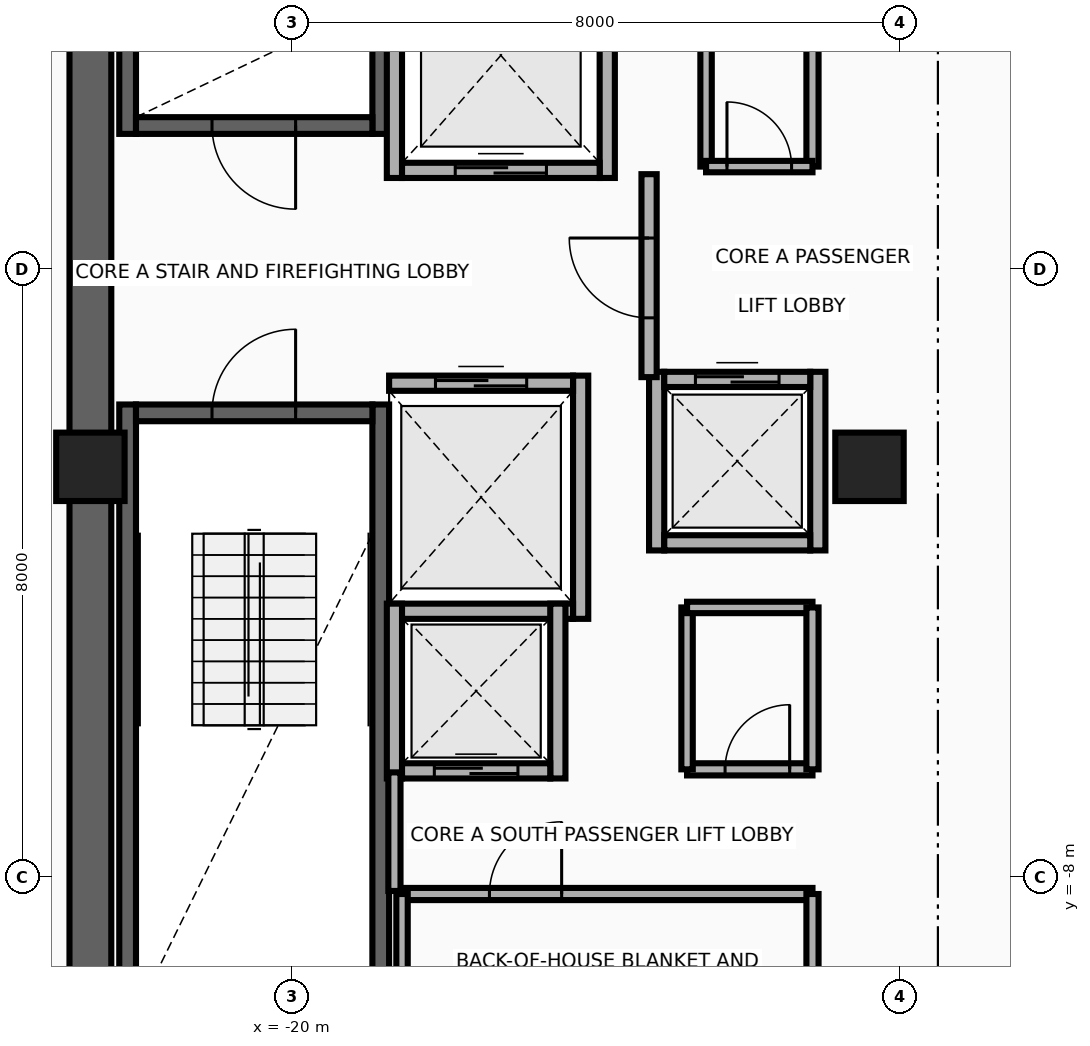
"""IFC4 building model, lengths in metres.
Left out: names, types, materials, properties, quantities, classifications, styles, units other than length and angle.
Written with IfcOpenShell. Run it as: python <this file> out.ifc"""

import sys

from ifc_helpers import new_model, si_unit, direction, frame, frame_2d, origin, origin_2d, place, context, subcontext, project, spatial, rectangle, extrude, source, transform, mapped, element, fill, save


model = new_model("IFC4")
c1 = context("Model", 3, precision=1e-05, world=origin(), true_north=direction((0.0, 1.0)))
c2 = subcontext(c1, "Body", "Model", "MODEL_VIEW")
j1 = project(units=[si_unit("LENGTHUNIT", "METRE"), si_unit("PLANEANGLEUNIT", "RADIAN")], contexts=[c1])
p1 = place(None, origin())
s1 = spatial("IfcSite", under=j1, at=p1, CompositionType="ELEMENT")
p2 = place(p1, origin())
s2 = spatial("IfcBuilding", under=s1, at=p2, CompositionType="ELEMENT")
p3 = place(p2, frame((0.0, 0.0, 226.5)))
s3 = spatial("IfcBuildingStorey", under=s2, at=p3, CompositionType="ELEMENT", Elevation=226.5)
for number, where, z_axis, x_axis in (
    (1, (-22.16, 1.78, 0.0), (0.0, 0.0, 1.0), (0.0, 1.0, 0.0)),
    (2, (-18.83, 1.78, 0.0), (0.0, 0.0, 1.0), (0.0, 1.0, 0.0)),
):
    element("IfcWall", number, at=place(p3, frame(where, z_axis=z_axis, x_axis=x_axis)), inside=s3, PredefinedType="SHEAR", context=c2, shape_type="SweptSolid", body=[
        extrude(rectangle(XDim=8.745, YDim=0.22, at=frame_2d((4.373, 0.0))), origin(), (0.0, 0.0, 1.0), 3.26),
    ])
p4 = place(p3, frame((-22.05, 1.89, 0.0), z_axis=(0.0, 0.0, 1.0), x_axis=(1.0, 0.0, 0.0)))
e3 = element("IfcWall", 3, at=p4, inside=s3, PredefinedType="SHEAR", context=c2, shape_type="SweptSolid", body=[
    extrude(rectangle(XDim=3.11, YDim=0.22, at=frame_2d((1.555, 0.0))), origin(), (0.0, 0.0, 1.0), 3.26),
])
p5 = place(p4, frame((1.0, 0.0, 0.0)))
e4 = element("IfcOpeningElement", 4, at=p5, cuts=e3, PredefinedType="OPENING", context=c2, shape_type="SweptSolid", body=[
    extrude(rectangle(XDim=1.1, YDim=2.15, at=frame_2d((0.55, 1.075))), frame((0.0, 0.125, 0.0), z_axis=(0.0, -1.0, 0.0), x_axis=(1.0, 0.0, 0.0)), (0.0, 0.0, 1.0), 0.25),
])
for number, where, z_axis, x_axis in (
    (5, (-22.16, -10.525, 0.0), (0.0, 0.0, 1.0), (0.0, 1.0, 0.0)),
    (6, (-18.83, -10.525, 0.0), (0.0, 0.0, 1.0), (0.0, 1.0, 0.0)),
):
    element("IfcWall", number, at=place(p3, frame(where, z_axis=z_axis, x_axis=x_axis)), inside=s3, PredefinedType="SHEAR", context=c2, shape_type="SweptSolid", body=[
        extrude(rectangle(XDim=8.745, YDim=0.22, at=frame_2d((4.373, 0.0))), origin(), (0.0, 0.0, 1.0), 3.26),
    ])
p6 = place(p3, frame((-22.05, -1.89, 0.0), z_axis=(0.0, 0.0, 1.0), x_axis=(1.0, 0.0, 0.0)))
e7 = element("IfcWall", 7, at=p6, inside=s3, PredefinedType="SHEAR", context=c2, shape_type="SweptSolid", body=[
    extrude(rectangle(XDim=3.11, YDim=0.22, at=frame_2d((1.555, 0.0))), origin(), (0.0, 0.0, 1.0), 3.26),
])
p7 = place(p6, frame((1.0, 0.0, 0.0)))
e8 = element("IfcOpeningElement", 8, at=p7, cuts=e7, PredefinedType="OPENING", context=c2, shape_type="SweptSolid", body=[
    extrude(rectangle(XDim=1.1, YDim=2.15, at=frame_2d((0.55, 1.075))), frame((0.0, 0.125, 0.0), z_axis=(0.0, -1.0, 0.0), x_axis=(1.0, 0.0, 0.0)), (0.0, 0.0, 1.0), 0.25),
])
p8 = place(p3, frame((-22.65, -11.075, 0.0), z_axis=(0.0, 0.0, 1.0), x_axis=(0.0, 1.0, 0.0)))
e9 = element("IfcWall", 9, at=p8, inside=s3, PredefinedType="SHEAR", context=c2, shape_type="SweptSolid", body=[
    extrude(rectangle(XDim=22.15, YDim=0.55, at=frame_2d((11.075, 0.0))), origin(), (0.0, 0.0, 1.0), 3.26),
])
m1 = source(origin(), c2, "Body", "SweptSolid", [
    extrude(rectangle(XDim=0.9, YDim=0.9, at=origin_2d()), origin(), (0.0, 0.0, 1.0), 3.5),
])
for number, where, z_axis, x_axis in (
    (10, (-22.65, -2.6, 0.0), (0.0, 0.0, 1.0), (1.0, 0.0, 0.0)),
    (11, (-12.4, -2.6, 0.0), (0.0, 0.0, 1.0), (1.0, 0.0, 0.0)),
):
    element("IfcColumn", number, at=place(p3, frame(where, z_axis=z_axis, x_axis=x_axis)), inside=s3, PredefinedType="COLUMN", context=c2, shape_type="MappedRepresentation", body=[
        mapped(m1, transform((0.0, 0.0, 0.0), x_axis=(1.0, 0.0, 0.0), y_axis=(0.0, 1.0, 0.0), z_axis=(0.0, 0.0, 1.0), scale=1.0)),
    ])
for number, where, z_axis, x_axis in (
    (12, (-18.65, 1.2, 0.0), (0.0, 0.0, 1.0), (0.0, 1.0, 0.0)),
    (13, (-15.85, 1.2, 0.0), (0.0, 0.0, 1.0), (0.0, 1.0, 0.0)),
):
    element("IfcWall", number, at=place(p3, frame(where, z_axis=z_axis, x_axis=x_axis)), inside=s3, PredefinedType="MOVABLE", context=c2, shape_type="SweptSolid", body=[
        extrude(rectangle(XDim=3.225, YDim=0.2, at=frame_2d((1.613, 0.0))), origin(), (0.0, 0.0, 1.0), 3.26),
    ])
p9 = place(p3, frame((-18.55, 1.3, 0.0), z_axis=(0.0, 0.0, 1.0), x_axis=(1.0, 0.0, 0.0)))
e14 = element("IfcWall", 14, at=p9, inside=s3, PredefinedType="MOVABLE", context=c2, shape_type="SweptSolid", body=[
    extrude(rectangle(XDim=2.6, YDim=0.2, at=frame_2d((1.3, 0.0))), origin(), (0.0, 0.0, 1.0), 3.26),
])
p10 = place(p9, frame((0.7, 0.0, 0.0)))
e15 = element("IfcOpeningElement", 15, at=p10, cuts=e14, PredefinedType="OPENING", context=c2, shape_type="SweptSolid", body=[
    extrude(rectangle(XDim=1.2, YDim=2.1, at=frame_2d((0.6, 1.05))), frame((0.0, 0.115, 0.0), z_axis=(0.0, -1.0, 0.0), x_axis=(1.0, 0.0, 0.0)), (0.0, 0.0, 1.0), 0.23),
])
p11 = place(p3, frame((-16.2, -4.6, 0.0), z_axis=(0.0, 0.0, 1.0), x_axis=(0.0, 1.0, 0.0)))
e16 = element("IfcWall", 16, at=p11, inside=s3, PredefinedType="MOVABLE", context=c2, shape_type="SweptSolid", body=[
    extrude(rectangle(XDim=3.2, YDim=0.2, at=frame_2d((1.6, 0.0))), origin(), (0.0, 0.0, 1.0), 3.26),
])
p12 = place(p3, frame((-18.72, -4.5, 0.0), z_axis=(0.0, 0.0, 1.0), x_axis=(1.0, 0.0, 0.0)))
e17 = element("IfcWall", 17, at=p12, inside=s3, PredefinedType="MOVABLE", context=c2, shape_type="SweptSolid", body=[
    extrude(rectangle(XDim=2.42, YDim=0.2, at=frame_2d((1.21, 0.0))), origin(), (0.0, 0.0, 1.0), 3.26),
])
p13 = place(p3, frame((-18.72, -1.5, 0.0), z_axis=(0.0, 0.0, 1.0), x_axis=(1.0, 0.0, 0.0)))
e18 = element("IfcWall", 18, at=p13, inside=s3, PredefinedType="MOVABLE", context=c2, shape_type="SweptSolid", body=[
    extrude(rectangle(XDim=2.42, YDim=0.2, at=frame_2d((1.21, 0.0))), origin(), (0.0, 0.0, 1.0), 3.26),
])
p14 = place(p13, frame((0.61, 0.0, 0.0)))
e19 = element("IfcOpeningElement", 19, at=p14, cuts=e18, PredefinedType="OPENING", context=c2, shape_type="SweptSolid", body=[
    extrude(rectangle(XDim=1.2, YDim=2.1, at=frame_2d((0.6, 1.05))), frame((0.0, 0.115, 0.0), z_axis=(0.0, -1.0, 0.0), x_axis=(1.0, 0.0, 0.0)), (0.0, 0.0, 1.0), 0.23),
])
for number, where, z_axis, x_axis in (
    (20, (-18.65, -6.7, 0.0), (0.0, 0.0, 1.0), (0.0, 1.0, 0.0)),
    (21, (-16.5, -6.7, 0.0), (0.0, 0.0, 1.0), (0.0, 1.0, 0.0)),
):
    element("IfcWall", number, at=place(p3, frame(where, z_axis=z_axis, x_axis=x_axis)), inside=s3, PredefinedType="MOVABLE", context=c2, shape_type="SweptSolid", body=[
        extrude(rectangle(XDim=2.3, YDim=0.2, at=frame_2d((1.15, 0.0))), origin(), (0.0, 0.0, 1.0), 3.26),
    ])
p15 = place(p3, frame((-18.55, -6.6, 0.0), z_axis=(0.0, 0.0, 1.0), x_axis=(1.0, 0.0, 0.0)))
e22 = element("IfcWall", 22, at=p15, inside=s3, PredefinedType="MOVABLE", context=c2, shape_type="SweptSolid", body=[
    extrude(rectangle(XDim=1.95, YDim=0.2, at=frame_2d((0.975, 0.0))), origin(), (0.0, 0.0, 1.0), 3.26),
])
p16 = place(p15, frame((0.425, 0.0, 0.0)))
e23 = element("IfcOpeningElement", 23, at=p16, cuts=e22, PredefinedType="OPENING", context=c2, shape_type="SweptSolid", body=[
    extrude(rectangle(XDim=1.1, YDim=2.1, at=frame_2d((0.55, 1.05))), frame((0.0, 0.115, 0.0), z_axis=(0.0, -1.0, 0.0), x_axis=(1.0, 0.0, 0.0)), (0.0, 0.0, 1.0), 0.23),
])
for number, where, z_axis, x_axis in (
    (24, (-15.2, -3.7, 0.0), (0.0, 0.0, 1.0), (0.0, 1.0, 0.0)),
    (25, (-13.08, -3.7, 0.0), (0.0, 0.0, 1.0), (0.0, 1.0, 0.0)),
):
    element("IfcWall", number, at=place(p3, frame(where, z_axis=z_axis, x_axis=x_axis)), inside=s3, PredefinedType="MOVABLE", context=c2, shape_type="SweptSolid", body=[
        extrude(rectangle(XDim=2.35, YDim=0.2, at=frame_2d((1.175, 0.0))), origin(), (0.0, 0.0, 1.0), 3.26),
    ])
p17 = place(p3, frame((-15.1, -3.6, 0.0), z_axis=(0.0, 0.0, 1.0), x_axis=(1.0, 0.0, 0.0)))
e26 = element("IfcWall", 26, at=p17, inside=s3, PredefinedType="MOVABLE", context=c2, shape_type="SweptSolid", body=[
    extrude(rectangle(XDim=1.92, YDim=0.2, at=frame_2d((0.96, 0.0))), origin(), (0.0, 0.0, 1.0), 3.26),
])
p18 = place(p3, frame((-15.1, -1.45, 0.0), z_axis=(0.0, 0.0, 1.0), x_axis=(1.0, 0.0, 0.0)))
e27 = element("IfcWall", 27, at=p18, inside=s3, PredefinedType="MOVABLE", context=c2, shape_type="SweptSolid", body=[
    extrude(rectangle(XDim=1.92, YDim=0.2, at=frame_2d((0.96, 0.0))), origin(), (0.0, 0.0, 1.0), 3.26),
])
p19 = place(p18, frame((0.41, 0.0, 0.0)))
e28 = element("IfcOpeningElement", 28, at=p19, cuts=e27, PredefinedType="OPENING", context=c2, shape_type="SweptSolid", body=[
    extrude(rectangle(XDim=1.1, YDim=2.1, at=frame_2d((0.55, 1.05))), frame((0.0, 0.115, 0.0), z_axis=(0.0, -1.0, 0.0), x_axis=(1.0, 0.0, 0.0)), (0.0, 0.0, 1.0), 0.23),
])
p20 = place(p3, frame((-15.3, -1.42, 0.0), z_axis=(0.0, 0.0, 1.0), x_axis=(0.0, 1.0, 0.0)))
e29 = element("IfcWall", 29, at=p20, inside=s3, PredefinedType="PARTITIONING", context=c2, shape_type="SweptSolid", body=[
    extrude(rectangle(XDim=2.67, YDim=0.2, at=frame_2d((1.335, 0.0))), origin(), (0.0, 0.0, 1.0), 3.26),
])
p21 = place(p20, frame((0.78, 0.0, 0.0)))
e30 = element("IfcOpeningElement", 30, at=p21, cuts=e29, PredefinedType="OPENING", context=c2, shape_type="SweptSolid", body=[
    extrude(rectangle(XDim=1.05, YDim=2.15, at=frame_2d((0.525, 1.075))), frame((0.0, 0.115, 0.0), z_axis=(0.0, -1.0, 0.0), x_axis=(1.0, 0.0, 0.0)), (0.0, 0.0, 1.0), 0.23),
])
p22 = place(p3, frame((-18.65, -8.18, 0.0), z_axis=(0.0, 0.0, 1.0), x_axis=(0.0, 1.0, 0.0)))
e31 = element("IfcWall", 31, at=p22, inside=s3, PredefinedType="PARTITIONING", context=c2, shape_type="SweptSolid", body=[
    extrude(rectangle(XDim=1.56, YDim=0.16, at=frame_2d((0.78, 0.0))), origin(), (0.0, 0.0, 1.0), 3.26),
])
p23 = place(p3, frame((-18.55, -8.22, 0.0), z_axis=(0.0, 0.0, 1.0), x_axis=(1.0, 0.0, 0.0)))
e32 = element("IfcWall", 32, at=p23, inside=s3, PredefinedType="PARTITIONING", context=c2, shape_type="SweptSolid", body=[
    extrude(rectangle(XDim=5.4, YDim=0.16, at=frame_2d((2.7, 0.0))), origin(), (0.0, 0.0, 1.0), 3.26),
])
p24 = place(p23, frame((1.15, 0.0, 0.0)))
e33 = element("IfcOpeningElement", 33, at=p24, cuts=e32, PredefinedType="OPENING", context=c2, shape_type="SweptSolid", body=[
    extrude(rectangle(XDim=0.95, YDim=2.15, at=frame_2d((0.475, 1.075))), frame((0.0, 0.095, 0.0), z_axis=(0.0, -1.0, 0.0), x_axis=(1.0, 0.0, 0.0)), (0.0, 0.0, 1.0), 0.19),
])
p25 = place(p3, frame((-18.55, -10.35, 0.0), z_axis=(0.0, 0.0, 1.0), x_axis=(0.0, 1.0, 0.0)))
e34 = element("IfcWall", 34, at=p25, inside=s3, PredefinedType="PARTITIONING", context=c2, shape_type="SweptSolid", body=[
    extrude(rectangle(XDim=2.13, YDim=0.15, at=frame_2d((1.065, 0.0))), origin(), (0.0, 0.0, 1.0), 3.26),
])
p26 = place(p3, frame((-13.15, -10.35, 0.0), z_axis=(0.0, 0.0, 1.0), x_axis=(0.0, 1.0, 0.0)))
e35 = element("IfcWall", 35, at=p26, inside=s3, PredefinedType="PARTITIONING", context=c2, shape_type="SweptSolid", body=[
    extrude(rectangle(XDim=2.13, YDim=0.16, at=frame_2d((1.065, 0.0))), origin(), (0.0, 0.0, 1.0), 3.26),
])
p27 = place(p3, frame((-14.8, -6.58, 0.0), z_axis=(0.0, 0.0, 1.0), x_axis=(1.0, 0.0, 0.0)))
e36 = element("IfcWall", 36, at=p27, inside=s3, PredefinedType="PARTITIONING", context=c2, shape_type="SweptSolid", body=[
    extrude(rectangle(XDim=1.65, YDim=0.16, at=frame_2d((0.825, 0.0))), origin(), (0.0, 0.0, 1.0), 3.26),
])
p28 = place(p27, frame((0.5, 0.0, 0.0)))
e37 = element("IfcOpeningElement", 37, at=p28, cuts=e36, PredefinedType="OPENING", context=c2, shape_type="SweptSolid", body=[
    extrude(rectangle(XDim=0.85, YDim=2.05, at=frame_2d((0.425, 1.025))), frame((0.0, 0.095, 0.0), z_axis=(0.0, -1.0, 0.0), x_axis=(1.0, 0.0, 0.0)), (0.0, 0.0, 1.0), 0.19),
])
p29 = place(p3, frame((-14.8, -6.58, 0.0), z_axis=(0.0, 0.0, 1.0), x_axis=(0.0, 1.0, 0.0)))
e38 = element("IfcWall", 38, at=p29, inside=s3, PredefinedType="PARTITIONING", context=c2, shape_type="SweptSolid", body=[
    extrude(rectangle(XDim=2.13, YDim=0.15, at=frame_2d((1.065, 0.0))), origin(), (0.0, 0.0, 1.0), 3.26),
])
p30 = place(p3, frame((-14.8, -4.45, 0.0), z_axis=(0.0, 0.0, 1.0), x_axis=(1.0, 0.0, 0.0)))
e39 = element("IfcWall", 39, at=p30, inside=s3, PredefinedType="PARTITIONING", context=c2, shape_type="SweptSolid", body=[
    extrude(rectangle(XDim=1.65, YDim=0.15, at=frame_2d((0.825, 0.0))), origin(), (0.0, 0.0, 1.0), 3.26),
])
p31 = place(p3, frame((-13.15, -6.58, 0.0), z_axis=(0.0, 0.0, 1.0), x_axis=(0.0, 1.0, 0.0)))
e40 = element("IfcWall", 40, at=p31, inside=s3, PredefinedType="PARTITIONING", context=c2, shape_type="SweptSolid", body=[
    extrude(rectangle(XDim=2.13, YDim=0.16, at=frame_2d((1.065, 0.0))), origin(), (0.0, 0.0, 1.0), 3.26),
])
p32 = place(p3, frame((-13.15, 1.35, 0.0), z_axis=(0.0, 0.0, 1.0), x_axis=(0.0, 1.0, 0.0)))
e41 = element("IfcWall", 41, at=p32, inside=s3, PredefinedType="PARTITIONING", context=c2, shape_type="SweptSolid", body=[
    extrude(rectangle(XDim=1.95, YDim=0.16, at=frame_2d((0.975, 0.0))), origin(), (0.0, 0.0, 1.0), 3.26),
])
p33 = place(p3, frame((-14.55, 1.35, 0.0), z_axis=(0.0, 0.0, 1.0), x_axis=(0.0, 1.0, 0.0)))
e42 = element("IfcWall", 42, at=p33, inside=s3, PredefinedType="PARTITIONING", context=c2, shape_type="SweptSolid", body=[
    extrude(rectangle(XDim=1.95, YDim=0.15, at=frame_2d((0.975, 0.0))), origin(), (0.0, 0.0, 1.0), 3.26),
])
p34 = place(p3, frame((-14.55, 1.35, 0.0), z_axis=(0.0, 0.0, 1.0), x_axis=(1.0, 0.0, 0.0)))
e43 = element("IfcWall", 43, at=p34, inside=s3, PredefinedType="PARTITIONING", context=c2, shape_type="SweptSolid", body=[
    extrude(rectangle(XDim=1.4, YDim=0.15, at=frame_2d((0.7, 0.0))), origin(), (0.0, 0.0, 1.0), 3.26),
])
p35 = place(p34, frame((0.275, 0.0, 0.0)))
e44 = element("IfcOpeningElement", 44, at=p35, cuts=e43, PredefinedType="OPENING", context=c2, shape_type="SweptSolid", body=[
    extrude(rectangle(XDim=0.85, YDim=2.05, at=frame_2d((0.425, 1.025))), frame((0.0, 0.09, 0.0), z_axis=(0.0, -1.0, 0.0), x_axis=(1.0, 0.0, 0.0)), (0.0, 0.0, 1.0), 0.18),
])
p36 = place(p10, origin())
e45 = element("IfcDoor", 45, at=p36, inside=s3, OperationType="DOUBLE_DOOR_SLIDING", PredefinedType="DOOR", context=c2, shape_type="SweptSolid", body=[
    extrude(rectangle(XDim=1.2, YDim=2.1, at=frame_2d((0.6, 1.05))), frame((0.0, 0.025, 0.0), z_axis=(0.0, -1.0, 0.0), x_axis=(1.0, 0.0, 0.0)), (0.0, 0.0, 1.0), 0.05),
])
fill(e15, e45)
p37 = place(p14, origin())
e46 = element("IfcDoor", 46, at=p37, inside=s3, OperationType="DOUBLE_DOOR_SLIDING", PredefinedType="DOOR", context=c2, shape_type="SweptSolid", body=[
    extrude(rectangle(XDim=1.2, YDim=2.1, at=frame_2d((0.6, 1.05))), frame((0.0, 0.025, 0.0), z_axis=(0.0, -1.0, 0.0), x_axis=(1.0, 0.0, 0.0)), (0.0, 0.0, 1.0), 0.05),
])
fill(e19, e46)
p38 = place(p16, origin())
e47 = element("IfcDoor", 47, at=p38, inside=s3, OperationType="DOUBLE_DOOR_SLIDING", PredefinedType="DOOR", context=c2, shape_type="SweptSolid", body=[
    extrude(rectangle(XDim=1.1, YDim=2.1, at=frame_2d((0.55, 1.05))), frame((0.0, 0.025, 0.0), z_axis=(0.0, -1.0, 0.0), x_axis=(1.0, 0.0, 0.0)), (0.0, 0.0, 1.0), 0.05),
])
fill(e23, e47)
p39 = place(p19, origin())
e48 = element("IfcDoor", 48, at=p39, inside=s3, OperationType="DOUBLE_DOOR_SLIDING", PredefinedType="DOOR", context=c2, shape_type="SweptSolid", body=[
    extrude(rectangle(XDim=1.1, YDim=2.1, at=frame_2d((0.55, 1.05))), frame((0.0, 0.025, 0.0), z_axis=(0.0, -1.0, 0.0), x_axis=(1.0, 0.0, 0.0)), (0.0, 0.0, 1.0), 0.05),
])
fill(e28, e48)
p40 = place(p21, origin())
e49 = element("IfcDoor", 49, at=p40, inside=s3, OperationType="SINGLE_SWING_RIGHT", PredefinedType="DOOR", context=c2, shape_type="SweptSolid", body=[
    extrude(rectangle(XDim=1.05, YDim=2.15, at=frame_2d((0.525, 1.075))), frame((0.0, 0.025, 0.0), z_axis=(0.0, -1.0, 0.0), x_axis=(1.0, 0.0, 0.0)), (0.0, 0.0, 1.0), 0.05),
])
fill(e30, e49)
p41 = place(p5, frame((1.1, 0.0, 0.0), z_axis=(0.0, 0.0, 1.0), x_axis=(-1.0, 0.0, 0.0)))
e50 = element("IfcDoor", 50, at=p41, inside=s3, OperationType="SINGLE_SWING_LEFT", PredefinedType="DOOR", context=c2, shape_type="SweptSolid", body=[
    extrude(rectangle(XDim=1.1, YDim=2.15, at=frame_2d((0.55, 1.075))), frame((0.0, 0.025, 0.0), z_axis=(0.0, -1.0, 0.0), x_axis=(1.0, 0.0, 0.0)), (0.0, 0.0, 1.0), 0.05),
])
fill(e4, e50)
p42 = place(p7, origin())
e51 = element("IfcDoor", 51, at=p42, inside=s3, OperationType="SINGLE_SWING_RIGHT", PredefinedType="DOOR", context=c2, shape_type="SweptSolid", body=[
    extrude(rectangle(XDim=1.1, YDim=2.15, at=frame_2d((0.55, 1.075))), frame((0.0, 0.025, 0.0), z_axis=(0.0, -1.0, 0.0), x_axis=(1.0, 0.0, 0.0)), (0.0, 0.0, 1.0), 0.05),
])
fill(e8, e51)
p43 = place(p24, origin())
e52 = element("IfcDoor", 52, at=p43, inside=s3, OperationType="SINGLE_SWING_RIGHT", PredefinedType="DOOR", context=c2, shape_type="SweptSolid", body=[
    extrude(rectangle(XDim=0.95, YDim=2.15, at=frame_2d((0.475, 1.075))), frame((0.0, 0.025, 0.0), z_axis=(0.0, -1.0, 0.0), x_axis=(1.0, 0.0, 0.0)), (0.0, 0.0, 1.0), 0.05),
])
fill(e33, e52)
p44 = place(p28, origin())
e53 = element("IfcDoor", 53, at=p44, inside=s3, OperationType="SINGLE_SWING_LEFT", PredefinedType="DOOR", context=c2, shape_type="SweptSolid", body=[
    extrude(rectangle(XDim=0.85, YDim=2.05, at=frame_2d((0.425, 1.025))), frame((0.0, 0.025, 0.0), z_axis=(0.0, -1.0, 0.0), x_axis=(1.0, 0.0, 0.0)), (0.0, 0.0, 1.0), 0.05),
])
fill(e37, e53)
p45 = place(p35, origin())
e54 = element("IfcDoor", 54, at=p45, inside=s3, OperationType="SINGLE_SWING_RIGHT", PredefinedType="DOOR", context=c2, shape_type="SweptSolid", body=[
    extrude(rectangle(XDim=0.85, YDim=2.05, at=frame_2d((0.425, 1.025))), frame((0.0, 0.025, 0.0), z_axis=(0.0, -1.0, 0.0), x_axis=(1.0, 0.0, 0.0)), (0.0, 0.0, 1.0), 0.05),
])
fill(e44, e54)
save(model, sys.argv[1])
